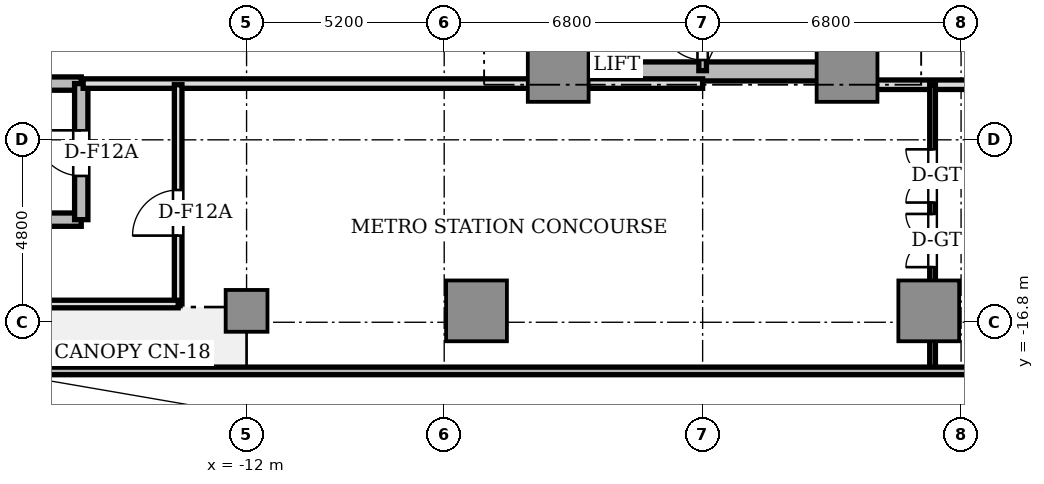
"""IFC4 building model, lengths in metres.
Left out: names, types, materials, properties, quantities, classifications, styles, units other than length and angle.
Written with IfcOpenShell. Run it as: python <this file> out.ifc"""

import sys

from ifc_helpers import new_model, si_unit, direction, frame, frame_2d, origin, origin_2d, place, context, subcontext, project, spatial, rectangle, circle, extrude, source, transform, mapped, element, fill, save


model = new_model("IFC4")
c1 = context("Model", 3, precision=1e-05, world=origin(), true_north=direction((0.0, 1.0)))
c2 = subcontext(c1, "Body", "Model", "MODEL_VIEW")
j1 = project(units=[si_unit("LENGTHUNIT", "METRE"), si_unit("PLANEANGLEUNIT", "RADIAN")], contexts=[c1])
p1 = place(None, origin())
s1 = spatial("IfcSite", under=j1, at=p1, CompositionType="ELEMENT")
p2 = place(p1, origin())
s2 = spatial("IfcBuilding", under=s1, at=p2, CompositionType="ELEMENT")
p3 = place(p2, origin())
s3 = spatial("IfcBuildingStorey", under=s2, at=p3, CompositionType="ELEMENT", Elevation=0.0)
p4 = place(p3, frame((-3.55, -10.2, 0.0), z_axis=(0.0, 0.0, 1.0), x_axis=(1.0, 0.0, 0.0)))
e1 = element("IfcWall", 1, at=p4, inside=s3, PredefinedType="SHEAR", context=c2, shape_type="SweptSolid", body=[
    extrude(rectangle(XDim=7.1, YDim=0.5, at=frame_2d((3.55, 0.0))), origin(), (0.0, 0.0, 1.0), 4.48),
])
p5 = place(p3, frame((3.8, -9.75, 0.0), z_axis=(0.0, 0.0, 1.0), x_axis=(0.0, 1.0, 0.0)))
e2 = element("IfcWall", 2, at=p5, inside=s3, PredefinedType="SHEAR", context=c2, shape_type="SweptSolid", body=[
    extrude(rectangle(XDim=6.9, YDim=0.5, at=frame_2d((3.45, 0.0))), origin(), (0.0, 0.0, 1.0), 4.48),
])
m1 = source(origin(), c2, "Body", "SweptSolid", [
    extrude(rectangle(XDim=1.6, YDim=1.6, at=origin_2d()), origin(), (0.0, 0.0, 1.0), 4.48),
])
for number, where, z_axis, x_axis in (
    (3, (-3.8, -10.2, 0.0), (0.0, 0.0, 1.0), (1.0, 0.0, 0.0)),
    (4, (3.8, -10.2, 0.0), (0.0, 0.0, 1.0), (1.0, 0.0, 0.0)),
    (5, (-5.95, -16.5, 0.0), (0.0, 0.0, 1.0), (1.0, 0.0, 0.0)),
    (6, (5.95, -16.5, 0.0), (0.0, 0.0, 1.0), (1.0, 0.0, 0.0)),
):
    element("IfcColumn", number, at=place(p3, frame(where, z_axis=z_axis, x_axis=x_axis)), inside=s3, PredefinedType="COLUMN", context=c2, shape_type="MappedRepresentation", body=[
        mapped(m1, transform((0.0, 0.0, 0.0), scale=1.0)),
    ])
m2 = source(origin(), c2, "Body", "SweptSolid", [
    extrude(circle(Radius=0.55, at=origin_2d()), origin(), (0.0, 0.0, 1.0), 4.48),
])
p6 = place(p3, frame((-12.0, -16.5, 0.0), z_axis=(0.0, 0.0, 1.0), x_axis=(1.0, 0.0, 0.0)))
e7 = element("IfcColumn", 7, at=p6, inside=s3, PredefinedType="COLUMN", context=c2, shape_type="MappedRepresentation", body=[
    mapped(m2, transform((0.0, 0.0, 0.0), scale=1.0)),
])
p7 = place(p3, frame((0.0, -10.18, 0.0), z_axis=(0.0, 0.0, 1.0), x_axis=(0.0, 1.0, 0.0)))
e8 = element("IfcWall", 8, at=p7, inside=s3, PredefinedType="SOLIDWALL", context=c2, shape_type="SweptSolid", body=[
    extrude(rectangle(XDim=7.68, YDim=0.2, at=frame_2d((3.84, 0.0))), origin(), (0.0, 0.0, 1.0), 4.48),
])
p8 = place(p7, frame((0.28, 0.0, 0.0)))
e9 = element("IfcOpeningElement", 9, at=p8, cuts=e8, PredefinedType="OPENING", context=c2, shape_type="SweptSolid", body=[
    extrude(rectangle(XDim=1.1, YDim=2.15, at=frame_2d((0.55, 1.075))), frame((0.0, 0.11, 0.0), z_axis=(0.0, -1.0, 0.0), x_axis=(1.0, 0.0, 0.0)), (0.0, 0.0, 1.0), 0.22),
])
for number, where, z_axis, x_axis in (
    (10, (-26.6, -10.52, 0.0), (0.0, 0.0, 1.0), (1.0, 0.0, 0.0)),
    (11, (-26.6, -14.1, 0.0), (0.0, 0.0, 1.0), (1.0, 0.0, 0.0)),
):
    element("IfcWall", number, at=place(p3, frame(where, z_axis=z_axis, x_axis=x_axis)), inside=s3, PredefinedType="SHEAR", context=c2, shape_type="SweptSolid", body=[
        extrude(rectangle(XDim=10.25, YDim=0.35, at=frame_2d((5.125, 0.0))), origin(), (0.0, 0.0, 1.0), 4.48),
    ])
p9 = place(p3, frame((-16.35, -14.1, 0.0), z_axis=(0.0, 0.0, 1.0), x_axis=(0.0, 1.0, 0.0)))
e12 = element("IfcWall", 12, at=p9, inside=s3, PredefinedType="SHEAR", context=c2, shape_type="SweptSolid", body=[
    extrude(rectangle(XDim=3.58, YDim=0.35, at=frame_2d((1.79, 0.0))), origin(), (0.0, 0.0, 1.0), 4.48),
])
p10 = place(p9, frame((1.15, 0.0, 0.0)))
e13 = element("IfcOpeningElement", 13, at=p10, cuts=e12, PredefinedType="OPENING", context=c2, shape_type="SweptSolid", body=[
    extrude(rectangle(XDim=1.2, YDim=2.2, at=frame_2d((0.6, 1.1))), frame((0.0, 0.185, 0.0), z_axis=(0.0, -1.0, 0.0), x_axis=(1.0, 0.0, 0.0)), (0.0, 0.0, 1.0), 0.37),
])
p11 = place(p3, frame((-2.92, -10.02, 0.0), z_axis=(0.0, 0.0, 1.0), x_axis=(0.0, 1.0, 0.0)))
e14 = element("IfcWall", 14, at=p11, inside=s3, PredefinedType="SOLIDWALL", context=c2, shape_type="SweptSolid", body=[
    extrude(rectangle(XDim=0.64, YDim=0.2, at=frame_2d((0.32, 0.0))), origin(), (0.0, 0.0, 1.0), 4.03),
])
p12 = place(p3, frame((-16.3, -10.52, 0.0), z_axis=(0.0, 0.0, 1.0), x_axis=(1.0, 0.0, 0.0)))
e15 = element("IfcWall", 15, at=p12, inside=s3, PredefinedType="SOLIDWALL", context=c2, shape_type="SweptSolid", body=[
    extrude(rectangle(XDim=16.3, YDim=0.25, at=frame_2d((8.15, 0.0))), origin(), (0.0, 0.0, 1.0), 4.03),
])
p13 = place(p3, frame((-13.8, -16.32, 0.0), z_axis=(0.0, 0.0, 1.0), x_axis=(0.0, 1.0, 0.0)))
e16 = element("IfcWall", 16, at=p13, inside=s3, PredefinedType="SOLIDWALL", context=c2, shape_type="SweptSolid", body=[
    extrude(rectangle(XDim=5.77, YDim=0.2, at=frame_2d((2.885, 0.0))), origin(), (0.0, 0.0, 1.0), 4.03),
])
p14 = place(p13, frame((1.8, 0.0, 0.0)))
e17 = element("IfcOpeningElement", 17, at=p14, cuts=e16, PredefinedType="OPENING", context=c2, shape_type="SweptSolid", body=[
    extrude(rectangle(XDim=1.2, YDim=2.2, at=frame_2d((0.6, 1.1))), frame((0.0, 0.11, 0.0), z_axis=(0.0, -1.0, 0.0), x_axis=(1.0, 0.0, 0.0)), (0.0, 0.0, 1.0), 0.22),
])
p15 = place(p3, frame((-35.68, -16.32, 0.0), z_axis=(0.0, 0.0, 1.0), x_axis=(1.0, 0.0, 0.0)))
e18 = element("IfcWall", 18, at=p15, inside=s3, PredefinedType="SOLIDWALL", context=c2, shape_type="SweptSolid", body=[
    extrude(rectangle(XDim=21.88, YDim=0.2, at=frame_2d((10.94, 0.0))), origin(), (0.0, 0.0, 1.0), 3.9),
])
p16 = place(p3, frame((4.0, -10.55, 0.0), z_axis=(0.0, 0.0, 1.0), x_axis=(1.0, 0.0, 0.0)))
e19 = element("IfcWall", 19, at=p16, inside=s3, PredefinedType="SOLIDWALL", context=c2, shape_type="SweptSolid", body=[
    extrude(rectangle(XDim=9.8, YDim=0.25, at=frame_2d((4.9, 0.0))), origin(), (0.0, 0.0, 1.0), 4.03),
])
p17 = place(p16, frame((5.0, 0.0, 0.0)))
e20 = element("IfcOpeningElement", 20, at=p17, cuts=e19, PredefinedType="OPENING", context=c2, shape_type="SweptSolid", body=[
    extrude(rectangle(XDim=1.2, YDim=2.2, at=frame_2d((0.6, 1.1))), frame((0.0, 0.135, 0.0), z_axis=(0.0, -1.0, 0.0), x_axis=(1.0, 0.0, 0.0)), (0.0, 0.0, 1.0), 0.27),
])
p18 = place(p3, frame((6.05, -18.05, 0.0), z_axis=(0.0, 0.0, 1.0), x_axis=(0.0, 1.0, 0.0)))
e21 = element("IfcWall", 21, at=p18, inside=s3, PredefinedType="PARTITIONING", context=c2, shape_type="SweptSolid", body=[
    extrude(rectangle(XDim=7.5, YDim=0.15, at=frame_2d((3.75, 0.0))), origin(), (0.0, 0.0, 1.0), 3.85),
])
p19 = place(p18, frame((2.7, 0.0, 0.0)))
e22 = element("IfcOpeningElement", 22, at=p19, cuts=e21, PredefinedType="OPENING", context=c2, shape_type="SweptSolid", body=[
    extrude(rectangle(XDim=1.4, YDim=2.1, at=frame_2d((0.7, 1.05))), frame((0.0, 0.085, 0.0), z_axis=(0.0, -1.0, 0.0), x_axis=(1.0, 0.0, 0.0)), (0.0, 0.0, 1.0), 0.17),
])
p20 = place(p18, frame((4.4, 0.0, 0.0)))
e23 = element("IfcOpeningElement", 23, at=p20, cuts=e21, PredefinedType="OPENING", context=c2, shape_type="SweptSolid", body=[
    extrude(rectangle(XDim=1.4, YDim=2.1, at=frame_2d((0.7, 1.05))), frame((0.0, 0.085, 0.0), z_axis=(0.0, -1.0, 0.0), x_axis=(1.0, 0.0, 0.0)), (0.0, 0.0, 1.0), 0.17),
])
p21 = place(p3, frame((-18.1, -18.08, 0.0), z_axis=(0.0, 0.0, 1.0), x_axis=(1.0, 0.0, 0.0)))
e24 = element("IfcWall", 24, at=p21, inside=s3, PredefinedType="SOLIDWALL", context=c2, shape_type="SweptSolid", body=[
    extrude(rectangle(XDim=53.85, YDim=0.2, at=frame_2d((26.925, 0.0))), origin(), (0.0, 0.0, 1.0), 4.48),
])
m3 = source(origin(), c2, "Body", "SweptSolid", [
    extrude(rectangle(XDim=1.1, YDim=0.05, at=origin_2d()), origin(), (0.0, 0.0, 1.0), 2.15),
])
p22 = place(p8, frame((0.55, 0.0, 0.0)))
e25 = element("IfcDoor", 25, at=p22, inside=s3, OperationType="SINGLE_SWING_RIGHT", PredefinedType="DOOR", context=c2, shape_type="MappedRepresentation", body=[
    mapped(m3, transform((0.0, 0.0, 0.0), scale=1.0)),
])
fill(e9, e25)
m4 = source(origin(), c2, "Body", "SweptSolid", [
    extrude(rectangle(XDim=1.2, YDim=0.05, at=origin_2d()), origin(), (0.0, 0.0, 1.0), 2.2),
])
p23 = place(p10, frame((0.6, 0.0, 0.0)))
e26 = element("IfcDoor", 26, at=p23, inside=s3, OperationType="SINGLE_SWING_RIGHT", PredefinedType="DOOR", context=c2, shape_type="MappedRepresentation", body=[
    mapped(m4, transform((0.0, 0.0, 0.0), scale=1.0)),
])
fill(e13, e26)
p24 = place(p14, frame((0.6, 0.0, 0.0)))
e27 = element("IfcDoor", 27, at=p24, inside=s3, OperationType="SINGLE_SWING_LEFT", PredefinedType="DOOR", context=c2, shape_type="MappedRepresentation", body=[
    mapped(m4, transform((0.0, 0.0, 0.0), scale=1.0)),
])
fill(e17, e27)
m5 = source(origin(), c2, "Body", "SweptSolid", [
    extrude(rectangle(XDim=1.4, YDim=0.05, at=origin_2d()), origin(), (0.0, 0.0, 1.0), 2.1),
])
p25 = place(p19, frame((0.7, 0.0, 0.0)))
e28 = element("IfcDoor", 28, at=p25, inside=s3, OperationType="DOUBLE_DOOR_SINGLE_SWING", PredefinedType="GATE", context=c2, shape_type="MappedRepresentation", body=[
    mapped(m5, transform((0.0, 0.0, 0.0), scale=1.0)),
])
fill(e22, e28)
p26 = place(p20, frame((0.7, 0.0, 0.0)))
e29 = element("IfcDoor", 29, at=p26, inside=s3, OperationType="DOUBLE_DOOR_SINGLE_SWING", PredefinedType="GATE", context=c2, shape_type="MappedRepresentation", body=[
    mapped(m5, transform((0.0, 0.0, 0.0), scale=1.0)),
])
fill(e23, e29)
save(model, sys.argv[1])
